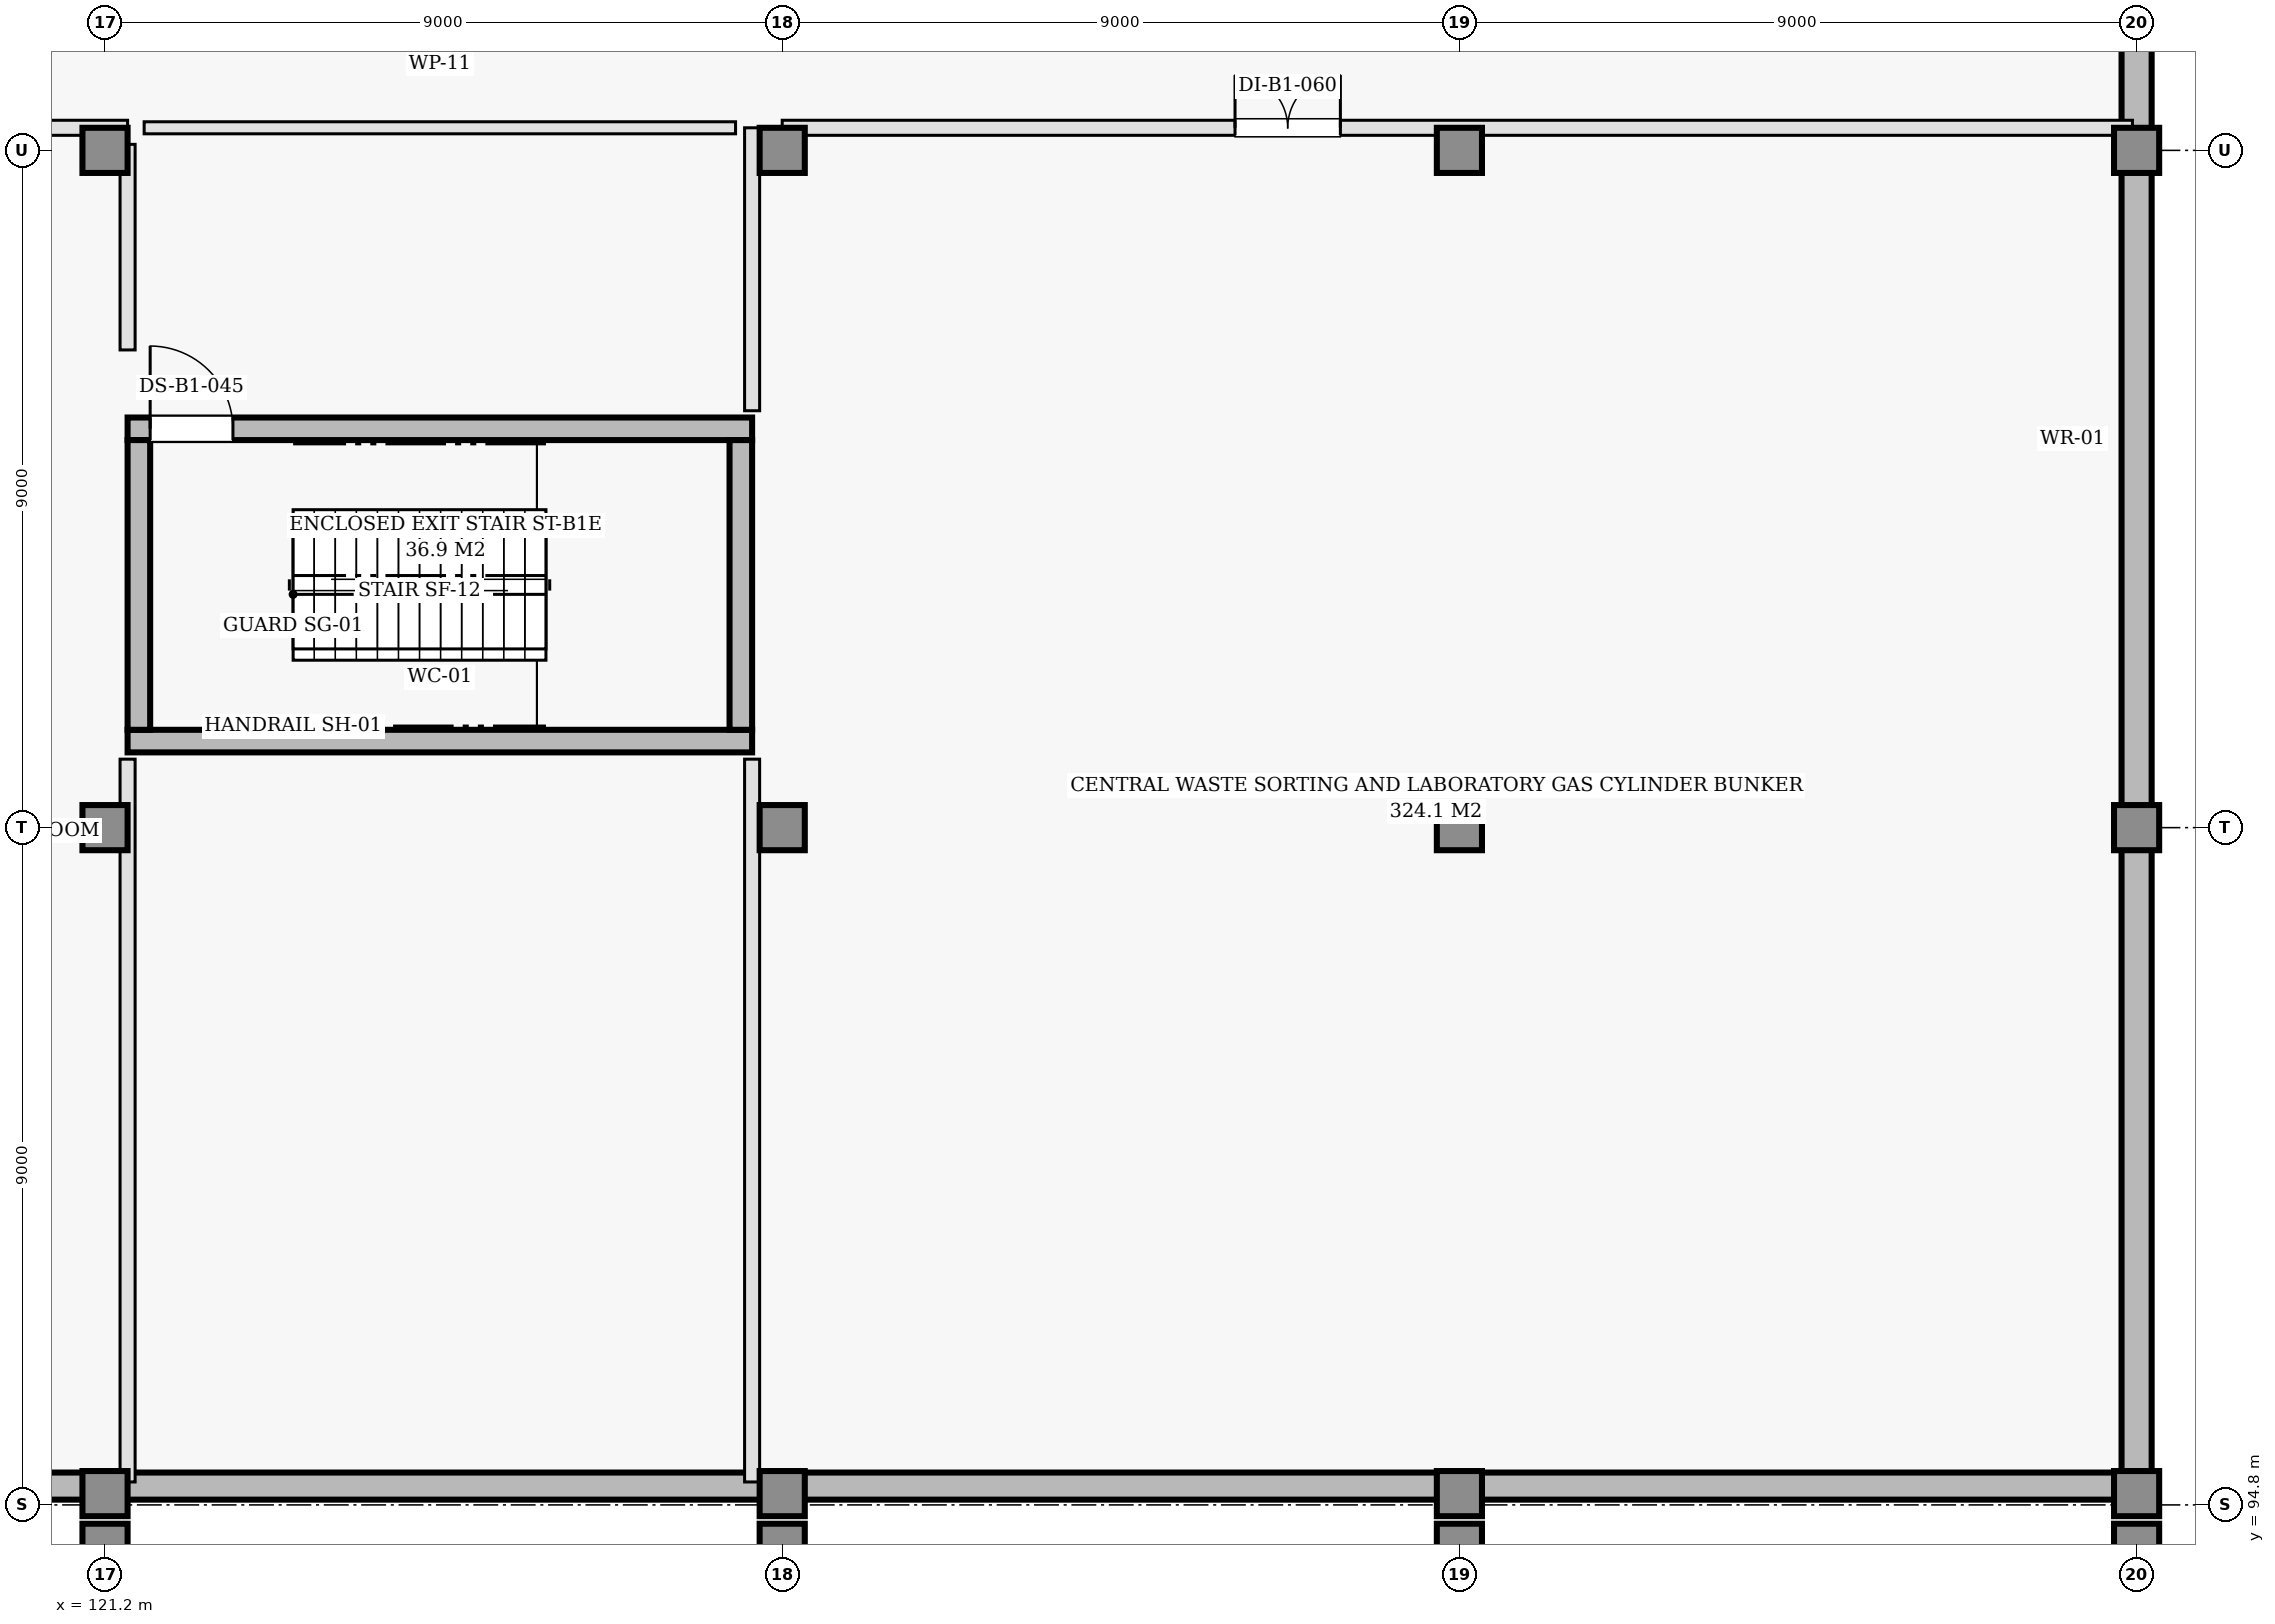
"""IFC4 building model, lengths in metres.
Left out: names, types, materials, properties, quantities, classifications, styles, units other than length and angle.
Written with IfcOpenShell. Run it as: python <this file> out.ifc"""

import sys

from ifc_helpers import new_model, si_unit, direction, frame, frame_2d, origin, origin_2d, place, context, subcontext, project, spatial, rectangle, extrude, element, fill, save


model = new_model("IFC4")
c1 = context("Model", 3, precision=1e-05, world=origin(), true_north=direction((0.0, 1.0)))
c2 = subcontext(c1, "Body", "Model", "MODEL_VIEW")
j1 = project(units=[si_unit("LENGTHUNIT", "METRE"), si_unit("PLANEANGLEUNIT", "RADIAN")], contexts=[c1])
p1 = place(None, origin())
s1 = spatial("IfcSite", under=j1, at=p1, CompositionType="ELEMENT")
p2 = place(p1, origin())
s2 = spatial("IfcBuilding", under=s1, at=p2, CompositionType="ELEMENT")
p3 = place(p2, frame((0.0, 0.0, -4.5)))
s3 = spatial("IfcBuildingStorey", under=s2, at=p3, CompositionType="ELEMENT", Elevation=-4.5)
for number, where, z_axis, x_axis in (
    (1, (121.2, 94.2, 0.0), (0.0, 0.0, 1.0), (1.0, 0.0, 0.0)),
    (2, (130.2, 94.2, 0.0), (0.0, 0.0, 1.0), (1.0, 0.0, 0.0)),
    (3, (139.2, 94.2, 0.0), (0.0, 0.0, 1.0), (1.0, 0.0, 0.0)),
    (4, (148.2, 94.2, 0.0), (0.0, 0.0, 1.0), (1.0, 0.0, 0.0)),
):
    element("IfcColumn", number, at=place(p3, frame(where, z_axis=z_axis, x_axis=x_axis)), inside=s3, PredefinedType="PILASTER", context=c2, shape_type="SweptSolid", body=[
        extrude(rectangle(XDim=0.7, YDim=0.7, at=origin_2d()), origin(), (0.0, 0.0, 1.0), 4.5),
    ])
for number, where, z_axis, x_axis in (
    (5, (121.2, 94.95, 0.0), (0.0, 0.0, 1.0), (1.0, 0.0, 0.0)),
    (6, (121.2, 103.8, 0.0), (0.0, 0.0, 1.0), (1.0, 0.0, 0.0)),
    (7, (121.2, 112.8, 0.0), (0.0, 0.0, 1.0), (1.0, 0.0, 0.0)),
    (8, (130.2, 94.95, 0.0), (0.0, 0.0, 1.0), (1.0, 0.0, 0.0)),
    (9, (130.2, 103.8, 0.0), (0.0, 0.0, 1.0), (1.0, 0.0, 0.0)),
    (10, (130.2, 112.8, 0.0), (0.0, 0.0, 1.0), (1.0, 0.0, 0.0)),
    (11, (139.2, 94.95, 0.0), (0.0, 0.0, 1.0), (1.0, 0.0, 0.0)),
    (12, (139.2, 103.8, 0.0), (0.0, 0.0, 1.0), (1.0, 0.0, 0.0)),
    (13, (139.2, 112.8, 0.0), (0.0, 0.0, 1.0), (1.0, 0.0, 0.0)),
    (14, (148.2, 94.95, 0.0), (0.0, 0.0, 1.0), (1.0, 0.0, 0.0)),
    (15, (148.2, 103.8, 0.0), (0.0, 0.0, 1.0), (1.0, 0.0, 0.0)),
    (16, (148.2, 112.8, 0.0), (0.0, 0.0, 1.0), (1.0, 0.0, 0.0)),
):
    element("IfcColumn", number, at=place(p3, frame(where, z_axis=z_axis, x_axis=x_axis)), inside=s3, PredefinedType="COLUMN", context=c2, shape_type="SweptSolid", body=[
        extrude(rectangle(XDim=0.6, YDim=0.6, at=origin_2d()), origin(), (0.0, 0.0, 1.0), 4.5),
    ])
p4 = place(p3, frame((0.0, 95.05, 0.0), z_axis=(0.0, 0.0, 1.0), x_axis=(1.0, 0.0, 0.0)))
e17 = element("IfcWall", 17, at=p4, inside=s3, PredefinedType="USERDEFINED", context=c2, shape_type="SweptSolid", body=[
    extrude(rectangle(XDim=148.2, YDim=0.36, at=frame_2d((74.1, 0.0))), origin(), (0.0, 0.0, 1.0), 4.15),
])
p5 = place(p3, frame((148.2, 95.05, 0.0), z_axis=(0.0, 0.0, 1.0), x_axis=(0.0, 1.0, 0.0)))
e18 = element("IfcWall", 18, at=p5, inside=s3, PredefinedType="USERDEFINED", context=c2, shape_type="SweptSolid", body=[
    extrude(rectangle(XDim=27.84, YDim=0.4, at=frame_2d((13.92, 0.0))), origin(), (0.0, 0.0, 1.0), 4.15),
])
p6 = place(p3, frame((121.5, 104.95, 0.0), z_axis=(0.0, 0.0, 1.0), x_axis=(1.0, 0.0, 0.0)))
e19 = element("IfcWall", 19, at=p6, inside=s3, PredefinedType="SHEAR", context=c2, shape_type="SweptSolid", body=[
    extrude(rectangle(XDim=8.3, YDim=0.3, at=frame_2d((4.15, 0.0))), origin(), (0.0, 0.0, 1.0), 4.15),
])
p7 = place(p3, frame((121.5, 109.1, 0.0), z_axis=(0.0, 0.0, 1.0), x_axis=(1.0, 0.0, 0.0)))
e20 = element("IfcWall", 20, at=p7, inside=s3, PredefinedType="SHEAR", context=c2, shape_type="SweptSolid", body=[
    extrude(rectangle(XDim=8.3, YDim=0.3, at=frame_2d((4.15, 0.0))), origin(), (0.0, 0.0, 1.0), 4.15),
])
p8 = place(p7, frame((0.3, 0.0, 0.0)))
e21 = element("IfcOpeningElement", 21, at=p8, cuts=e20, PredefinedType="OPENING", context=c2, shape_type="SweptSolid", body=[
    extrude(rectangle(XDim=1.1, YDim=2.15, at=frame_2d((0.55, 1.075))), frame((0.0, 0.16, 0.0), z_axis=(0.0, -1.0, 0.0), x_axis=(1.0, 0.0, 0.0)), (0.0, 0.0, 1.0), 0.32),
])
for number, where, z_axis, x_axis in (
    (22, (121.65, 105.1, 0.0), (0.0, 0.0, 1.0), (0.0, 1.0, 0.0)),
    (23, (129.65, 105.1, 0.0), (0.0, 0.0, 1.0), (0.0, 1.0, 0.0)),
):
    element("IfcWall", number, at=place(p3, frame(where, z_axis=z_axis, x_axis=x_axis)), inside=s3, PredefinedType="SHEAR", context=c2, shape_type="SweptSolid", body=[
        extrude(rectangle(XDim=3.85, YDim=0.3, at=frame_2d((1.925, 0.0))), origin(), (0.0, 0.0, 1.0), 4.15),
    ])
p9 = place(p3, frame((118.146, 113.1, 0.0), z_axis=(0.0, 0.0, 1.0), x_axis=(1.0, 0.0, 0.0)))
e24 = element("IfcWall", 24, at=p9, inside=s3, PredefinedType="PARTITIONING", context=c2, shape_type="SweptSolid", body=[
    extrude(rectangle(XDim=3.354, YDim=0.2, at=frame_2d((1.677, 0.0))), origin(), (0.0, 0.0, 1.0), 3.385),
])
p10 = place(p3, frame((121.5, 110.148, 0.0), z_axis=(0.0, 0.0, 1.0), x_axis=(0.0, 1.0, 0.0)))
e25 = element("IfcWall", 25, at=p10, inside=s3, PredefinedType="PARTITIONING", context=c2, shape_type="SweptSolid", body=[
    extrude(rectangle(XDim=2.732, YDim=0.2, at=frame_2d((1.366, 0.0))), origin(), (0.0, 0.0, 1.0), 3.385),
])
p11 = place(p3, frame((121.5, 95.105, 0.0), z_axis=(0.0, 0.0, 1.0), x_axis=(0.0, 1.0, 0.0)))
e26 = element("IfcWall", 26, at=p11, inside=s3, PredefinedType="PARTITIONING", context=c2, shape_type="SweptSolid", body=[
    extrude(rectangle(XDim=9.605, YDim=0.2, at=frame_2d((4.802, 0.0))), origin(), (0.0, 0.0, 1.0), 3.385),
])
p12 = place(p3, frame((130.2, 113.1, 0.0), z_axis=(0.0, 0.0, 1.0), x_axis=(1.0, 0.0, 0.0)))
e27 = element("IfcWall", 27, at=p12, inside=s3, PredefinedType="PARTITIONING", context=c2, shape_type="SweptSolid", body=[
    extrude(rectangle(XDim=17.945, YDim=0.2, at=frame_2d((8.973, 0.0))), origin(), (0.0, 0.0, 1.0), 3.385),
])
p13 = place(p12, frame((6.018, 0.0, 0.0)))
e28 = element("IfcOpeningElement", 28, at=p13, cuts=e27, PredefinedType="OPENING", context=c2, shape_type="SweptSolid", body=[
    extrude(rectangle(XDim=1.4, YDim=2.15, at=frame_2d((0.7, 1.075))), frame((0.0, 0.11, 0.0), z_axis=(0.0, -1.0, 0.0), x_axis=(1.0, 0.0, 0.0)), (0.0, 0.0, 1.0), 0.22),
])
p14 = place(p3, frame((129.8, 109.34, 0.0), z_axis=(0.0, 0.0, 1.0), x_axis=(0.0, 1.0, 0.0)))
e29 = element("IfcWall", 29, at=p14, inside=s3, PredefinedType="PARTITIONING", context=c2, shape_type="SweptSolid", body=[
    extrude(rectangle(XDim=3.76, YDim=0.2, at=frame_2d((1.88, 0.0))), origin(), (0.0, 0.0, 1.0), 3.385),
])
p15 = place(p3, frame((129.8, 95.105, 0.0), z_axis=(0.0, 0.0, 1.0), x_axis=(0.0, 1.0, 0.0)))
e30 = element("IfcWall", 30, at=p15, inside=s3, PredefinedType="PARTITIONING", context=c2, shape_type="SweptSolid", body=[
    extrude(rectangle(XDim=9.605, YDim=0.2, at=frame_2d((4.802, 0.0))), origin(), (0.0, 0.0, 1.0), 3.385),
])
p16 = place(p3, frame((121.72, 113.1, 0.0), z_axis=(0.0, 0.0, 1.0), x_axis=(1.0, 0.0, 0.0)))
e31 = element("IfcWall", 31, at=p16, inside=s3, PredefinedType="PARTITIONING", context=c2, shape_type="SweptSolid", body=[
    extrude(rectangle(XDim=7.86, YDim=0.16, at=frame_2d((3.93, 0.0))), origin(), (0.0, 0.0, 1.0), 3.385),
])
p17 = place(p8, origin())
e32 = element("IfcDoor", 32, at=p17, inside=s3, OperationType="SINGLE_SWING_LEFT", PredefinedType="DOOR", context=c2, shape_type="SweptSolid", body=[
    extrude(rectangle(XDim=1.1, YDim=2.15, at=frame_2d((0.55, 1.075))), frame((0.0, 0.025, 0.0), z_axis=(0.0, -1.0, 0.0), x_axis=(1.0, 0.0, 0.0)), (0.0, 0.0, 1.0), 0.05),
])
fill(e21, e32)
p18 = place(p13, origin())
e33 = element("IfcDoor", 33, at=p18, inside=s3, OperationType="DOUBLE_DOOR_SINGLE_SWING", PredefinedType="DOOR", context=c2, shape_type="SweptSolid", body=[
    extrude(rectangle(XDim=1.4, YDim=2.15, at=frame_2d((0.7, 1.075))), frame((0.0, 0.025, 0.0), z_axis=(0.0, -1.0, 0.0), x_axis=(1.0, 0.0, 0.0)), (0.0, 0.0, 1.0), 0.05),
])
fill(e28, e33)
save(model, sys.argv[1])
